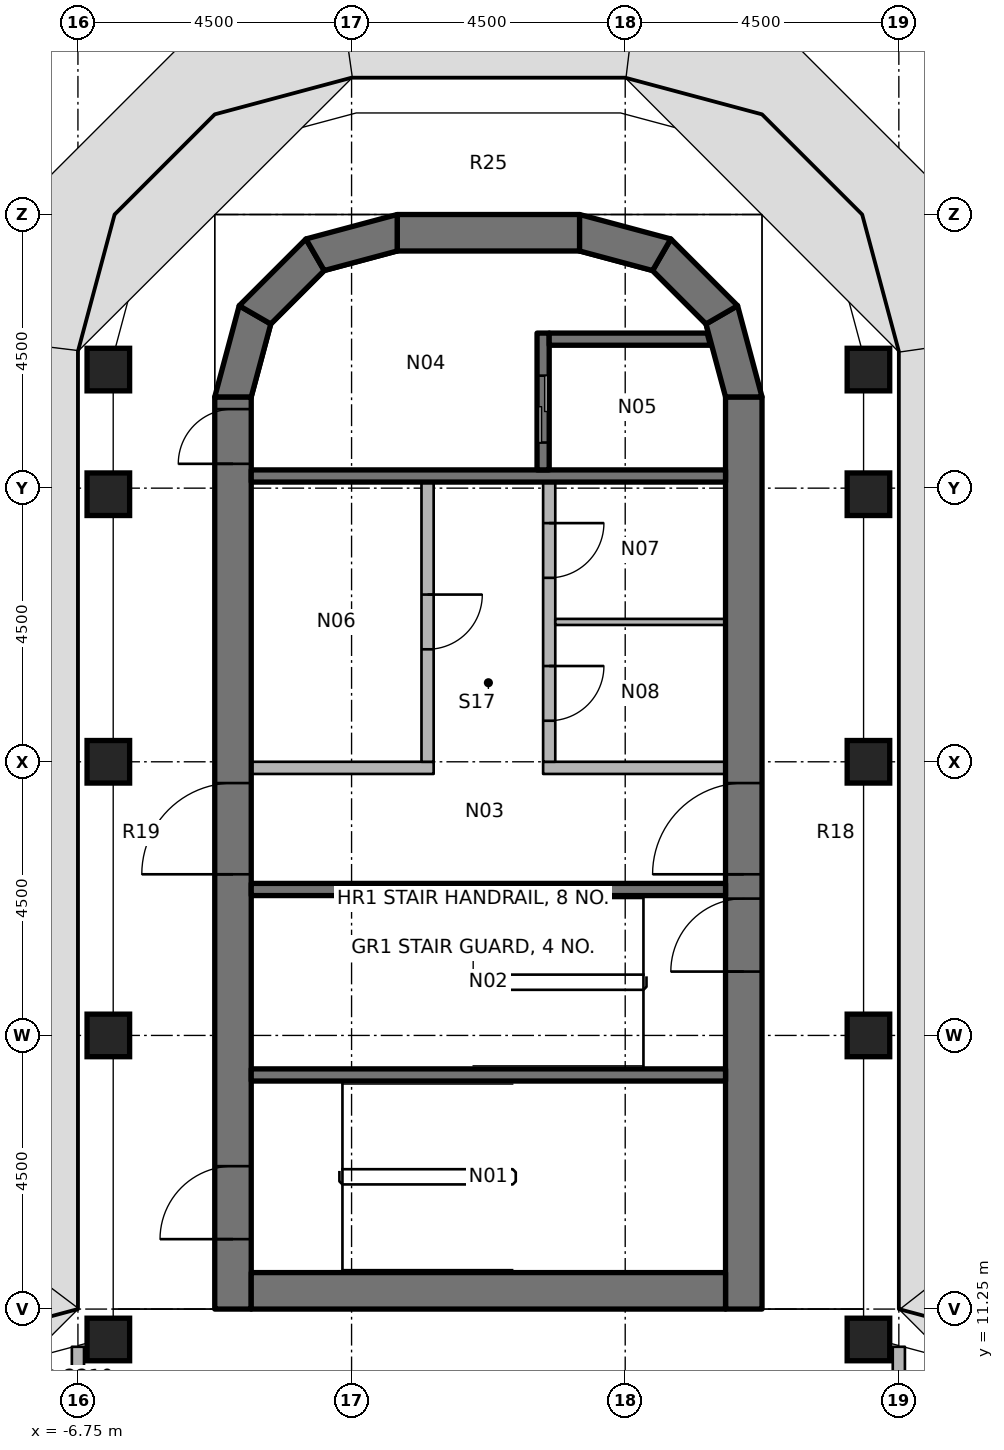
"""IFC4 building model, lengths in metres.
Left out: names, types, materials, properties, quantities, classifications, styles, units other than length and angle.
Written with IfcOpenShell. Run it as: python <this file> out.ifc"""

import sys

from ifc_helpers import new_model, si_unit, direction, frame, frame_2d, origin, origin_2d, place, context, subcontext, project, spatial, polyline, rectangle, outline, extrude, element, fill, save


model = new_model("IFC4")
c1 = context("Model", 3, precision=1e-05, world=origin(), true_north=direction((0.0, 1.0)))
c2 = subcontext(c1, "Body", "Model", "MODEL_VIEW")
j1 = project(units=[si_unit("LENGTHUNIT", "METRE"), si_unit("PLANEANGLEUNIT", "RADIAN")], contexts=[c1])
p1 = place(None, origin())
s1 = spatial("IfcSite", under=j1, at=p1, CompositionType="ELEMENT")
p2 = place(p1, origin())
s2 = spatial("IfcBuilding", under=s1, at=p2, CompositionType="ELEMENT")
p3 = place(p2, frame((0.0, 0.0, 206.8)))
s3 = spatial("IfcBuildingStorey", under=s2, at=p3, CompositionType="ELEMENT", Elevation=206.8)
for number, where, z_axis, x_axis in (
    (1, (-6.25, 10.75, 0.0), (0.0, 0.0, 1.0), (1.0, 0.0, 0.0)),
    (2, (-6.25, 15.75, 0.0), (0.0, 0.0, 1.0), (1.0, 0.0, 0.0)),
    (3, (-6.25, 20.25, 0.0), (0.0, 0.0, 1.0), (1.0, 0.0, 0.0)),
    (4, (-6.25, 24.65, 0.0), (0.0, 0.0, 1.0), (1.0, 0.0, 0.0)),
    (5, (-6.25, 26.7, 0.0), (0.0, 0.0, 1.0), (1.0, 0.0, 0.0)),
    (6, (6.25, 10.75, 0.0), (0.0, 0.0, 1.0), (1.0, 0.0, 0.0)),
    (7, (6.25, 15.75, 0.0), (0.0, 0.0, 1.0), (1.0, 0.0, 0.0)),
    (8, (6.25, 20.25, 0.0), (0.0, 0.0, 1.0), (1.0, 0.0, 0.0)),
    (9, (6.25, 24.65, 0.0), (0.0, 0.0, 1.0), (1.0, 0.0, 0.0)),
    (10, (6.25, 26.7, 0.0), (0.0, 0.0, 1.0), (1.0, 0.0, 0.0)),
):
    element("IfcColumn", number, at=place(p3, frame(where, z_axis=z_axis, x_axis=x_axis)), inside=s3, PredefinedType="COLUMN", context=c2, shape_type="SweptSolid", body=[
        extrude(rectangle(XDim=0.7, YDim=0.7, at=origin_2d()), origin(), (0.0, 0.0, 1.0), 3.65),
    ])
p4 = place(p3, frame((-4.2, 11.25, 0.0), z_axis=(0.0, 0.0, 1.0), x_axis=(0.0, 1.0, 0.0)))
e11 = element("IfcWall", 11, at=p4, inside=s3, PredefinedType="SHEAR", context=c2, shape_type="SweptSolid", body=[
    extrude(rectangle(XDim=15.0, YDim=0.6, at=frame_2d((7.5, 0.0))), origin(), (0.0, 0.0, 1.0), 3.8),
])
p5 = place(p4, frame((7.15, 0.0, 0.0)))
e12 = element("IfcOpeningElement", 12, at=p5, cuts=e11, PredefinedType="OPENING", context=c2, shape_type="SweptSolid", body=[
    extrude(rectangle(XDim=1.5, YDim=2.3, at=frame_2d((0.75, 1.15))), frame((0.0, 0.31, 0.0), z_axis=(0.0, -1.0, 0.0), x_axis=(1.0, 0.0, 0.0)), (0.0, 0.0, 1.0), 0.62),
])
p6 = place(p4, frame((13.9, 0.0, 0.0)))
e13 = element("IfcOpeningElement", 13, at=p6, cuts=e11, PredefinedType="OPENING", context=c2, shape_type="SweptSolid", body=[
    extrude(rectangle(XDim=0.9, YDim=2.1, at=frame_2d((0.45, 1.05))), frame((0.0, 0.31, 0.0), z_axis=(0.0, -1.0, 0.0), x_axis=(1.0, 0.0, 0.0)), (0.0, 0.0, 1.0), 0.62),
])
p7 = place(p4, frame((1.15, 0.0, 0.0)))
e14 = element("IfcOpeningElement", 14, at=p7, cuts=e11, PredefinedType="OPENING", context=c2, shape_type="SweptSolid", body=[
    extrude(rectangle(XDim=1.2, YDim=2.1, at=frame_2d((0.6, 1.05))), frame((0.0, 0.31, 0.0), z_axis=(0.0, -1.0, 0.0), x_axis=(1.0, 0.0, 0.0)), (0.0, 0.0, 1.0), 0.62),
])
p8 = place(p3, frame((4.2, 11.25, 0.0), z_axis=(0.0, 0.0, 1.0), x_axis=(0.0, 1.0, 0.0)))
e15 = element("IfcWall", 15, at=p8, inside=s3, PredefinedType="SHEAR", context=c2, shape_type="SweptSolid", body=[
    extrude(rectangle(XDim=15.0, YDim=0.6, at=frame_2d((7.5, 0.0))), origin(), (0.0, 0.0, 1.0), 3.8),
])
p9 = place(p8, frame((7.15, 0.0, 0.0)))
e16 = element("IfcOpeningElement", 16, at=p9, cuts=e15, PredefinedType="OPENING", context=c2, shape_type="SweptSolid", body=[
    extrude(rectangle(XDim=1.5, YDim=2.3, at=frame_2d((0.75, 1.15))), frame((0.0, 0.31, 0.0), z_axis=(0.0, -1.0, 0.0), x_axis=(1.0, 0.0, 0.0)), (0.0, 0.0, 1.0), 0.62),
])
p10 = place(p8, frame((5.55, 0.0, 0.0)))
e17 = element("IfcOpeningElement", 17, at=p10, cuts=e15, PredefinedType="OPENING", context=c2, shape_type="SweptSolid", body=[
    extrude(rectangle(XDim=1.2, YDim=2.1, at=frame_2d((0.6, 1.05))), frame((0.0, 0.31, 0.0), z_axis=(0.0, -1.0, 0.0), x_axis=(1.0, 0.0, 0.0)), (0.0, 0.0, 1.0), 0.62),
])
p11 = place(p3, frame((-3.9, 11.55, 0.0), z_axis=(0.0, 0.0, 1.0), x_axis=(1.0, 0.0, 0.0)))
e18 = element("IfcWall", 18, at=p11, inside=s3, PredefinedType="SHEAR", context=c2, shape_type="SweptSolid", body=[
    extrude(rectangle(XDim=7.8, YDim=0.6, at=frame_2d((3.9, 0.0))), origin(), (0.0, 0.0, 1.0), 3.8),
])
p12 = place(p3, frame((-1.5, 28.95, 0.0), z_axis=(0.0, 0.0, 1.0), x_axis=(1.0, 0.0, 0.0)))
e19 = element("IfcWall", 19, at=p12, inside=s3, PredefinedType="SHEAR", context=c2, shape_type="SweptSolid", body=[
    extrude(rectangle(XDim=3.0, YDim=0.6, at=frame_2d((1.5, 0.0))), origin(), (0.0, 0.0, 1.0), 3.8),
])
p13 = place(p3, origin())
e20 = element("IfcWall", 20, at=p13, inside=s3, PredefinedType="SHEAR", context=c2, shape_type="SweptSolid", body=[
    extrude(outline(polyline([(-4.5, 26.25), (-4.098, 27.75), (-3.579, 27.45), (-3.9, 26.25), (-4.5, 26.25)])), origin(), (0.0, 0.0, 1.0), 3.8),
])
p14 = place(p3, origin())
e21 = element("IfcWall", 21, at=p14, inside=s3, PredefinedType="SHEAR", context=c2, shape_type="SweptSolid", body=[
    extrude(outline(polyline([(-4.098, 27.75), (-3.0, 28.848), (-2.7, 28.329), (-3.579, 27.45), (-4.098, 27.75)])), origin(), (0.0, 0.0, 1.0), 3.8),
])
p15 = place(p3, origin())
e22 = element("IfcWall", 22, at=p15, inside=s3, PredefinedType="SHEAR", context=c2, shape_type="SweptSolid", body=[
    extrude(outline(polyline([(-3.0, 28.848), (-1.5, 29.25), (-1.5, 28.65), (-2.7, 28.329), (-3.0, 28.848)])), origin(), (0.0, 0.0, 1.0), 3.8),
])
p16 = place(p3, origin())
e23 = element("IfcWall", 23, at=p16, inside=s3, PredefinedType="SHEAR", context=c2, shape_type="SweptSolid", body=[
    extrude(outline(polyline([(4.5, 26.25), (4.098, 27.75), (3.579, 27.45), (3.9, 26.25), (4.5, 26.25)])), origin(), (0.0, 0.0, 1.0), 3.8),
])
p17 = place(p3, origin())
e24 = element("IfcWall", 24, at=p17, inside=s3, PredefinedType="SHEAR", context=c2, shape_type="SweptSolid", body=[
    extrude(outline(polyline([(4.098, 27.75), (3.0, 28.848), (2.7, 28.329), (3.579, 27.45), (4.098, 27.75)])), origin(), (0.0, 0.0, 1.0), 3.8),
])
p18 = place(p3, origin())
e25 = element("IfcWall", 25, at=p18, inside=s3, PredefinedType="SHEAR", context=c2, shape_type="SweptSolid", body=[
    extrude(outline(polyline([(3.0, 28.848), (1.5, 29.25), (1.5, 28.65), (2.7, 28.329), (3.0, 28.848)])), origin(), (0.0, 0.0, 1.0), 3.8),
])
p19 = place(p3, frame((-3.9, 24.95, 0.0), z_axis=(0.0, 0.0, 1.0), x_axis=(1.0, 0.0, 0.0)))
e26 = element("IfcWall", 26, at=p19, inside=s3, PredefinedType="SHEAR", context=c2, shape_type="SweptSolid", body=[
    extrude(rectangle(XDim=7.8, YDim=0.2, at=frame_2d((3.9, 0.0))), origin(), (0.0, 0.0, 1.0), 3.65),
])
p20 = place(p3, frame((0.9, 27.3, 0.0), z_axis=(0.0, 0.0, 1.0), x_axis=(0.0, -1.0, 0.0)))
e27 = element("IfcWall", 27, at=p20, inside=s3, PredefinedType="SHEAR", context=c2, shape_type="SweptSolid", body=[
    extrude(rectangle(XDim=2.25, YDim=0.2, at=frame_2d((1.125, 0.0))), origin(), (0.0, 0.0, 1.0), 3.65),
])
p21 = place(p20, frame((0.7, 0.0, 0.0)))
e28 = element("IfcOpeningElement", 28, at=p21, cuts=e27, PredefinedType="OPENING", context=c2, shape_type="SweptSolid", body=[
    extrude(rectangle(XDim=1.1, YDim=2.3, at=frame_2d((0.55, 1.15))), frame((0.0, 0.11, 0.0), z_axis=(0.0, -1.0, 0.0), x_axis=(1.0, 0.0, 0.0)), (0.0, 0.0, 1.0), 0.22),
])
p22 = place(p3, origin())
e29 = element("IfcWall", 29, at=p22, inside=s3, PredefinedType="SHEAR", context=c2, shape_type="SweptSolid", body=[
    extrude(outline(polyline([(1.0, 27.1), (3.651, 27.1), (3.597, 27.3), (1.0, 27.3), (1.0, 27.1)])), origin(), (0.0, 0.0, 1.0), 3.65),
])
for number, where, z_axis, x_axis in (
    (30, (-3.9, 18.15, 0.0), (0.0, 0.0, 1.0), (1.0, 0.0, 0.0)),
    (31, (-3.9, 15.1, 0.0), (0.0, 0.0, 1.0), (1.0, 0.0, 0.0)),
):
    element("IfcWall", number, at=place(p3, frame(where, z_axis=z_axis, x_axis=x_axis)), inside=s3, PredefinedType="SHEAR", context=c2, shape_type="SweptSolid", body=[
        extrude(rectangle(XDim=7.8, YDim=0.2, at=frame_2d((3.9, 0.0))), origin(), (0.0, 0.0, 1.0), 3.65),
    ])
p23 = place(p3, frame((-3.9, 20.15, 0.0), z_axis=(0.0, 0.0, 1.0), x_axis=(1.0, 0.0, 0.0)))
e32 = element("IfcWall", 32, at=p23, inside=s3, PredefinedType="PARTITIONING", context=c2, shape_type="SweptSolid", body=[
    extrude(rectangle(XDim=3.0, YDim=0.2, at=frame_2d((1.5, 0.0))), origin(), (0.0, 0.0, 1.0), 3.65),
])
p24 = place(p3, frame((-1.0, 24.85, 0.0), z_axis=(0.0, 0.0, 1.0), x_axis=(0.0, -1.0, 0.0)))
e33 = element("IfcWall", 33, at=p24, inside=s3, PredefinedType="PARTITIONING", context=c2, shape_type="SweptSolid", body=[
    extrude(rectangle(XDim=4.6, YDim=0.2, at=frame_2d((2.3, 0.0))), origin(), (0.0, 0.0, 1.0), 3.65),
])
p25 = place(p24, frame((1.85, 0.0, 0.0)))
e34 = element("IfcOpeningElement", 34, at=p25, cuts=e33, PredefinedType="OPENING", context=c2, shape_type="SweptSolid", body=[
    extrude(rectangle(XDim=0.9, YDim=2.1, at=frame_2d((0.45, 1.05))), frame((0.0, 0.11, 0.0), z_axis=(0.0, -1.0, 0.0), x_axis=(1.0, 0.0, 0.0)), (0.0, 0.0, 1.0), 0.22),
])
p26 = place(p3, frame((0.9, 20.15, 0.0), z_axis=(0.0, 0.0, 1.0), x_axis=(1.0, 0.0, 0.0)))
e35 = element("IfcWall", 35, at=p26, inside=s3, PredefinedType="PARTITIONING", context=c2, shape_type="SweptSolid", body=[
    extrude(rectangle(XDim=3.0, YDim=0.2, at=frame_2d((1.5, 0.0))), origin(), (0.0, 0.0, 1.0), 3.65),
])
p27 = place(p3, frame((1.0, 24.85, 0.0), z_axis=(0.0, 0.0, 1.0), x_axis=(0.0, -1.0, 0.0)))
e36 = element("IfcWall", 36, at=p27, inside=s3, PredefinedType="PARTITIONING", context=c2, shape_type="SweptSolid", body=[
    extrude(rectangle(XDim=4.6, YDim=0.2, at=frame_2d((2.3, 0.0))), origin(), (0.0, 0.0, 1.0), 3.65),
])
p28 = place(p27, frame((0.675, 0.0, 0.0)))
e37 = element("IfcOpeningElement", 37, at=p28, cuts=e36, PredefinedType="OPENING", context=c2, shape_type="SweptSolid", body=[
    extrude(rectangle(XDim=0.9, YDim=2.1, at=frame_2d((0.45, 1.05))), frame((0.0, 0.11, 0.0), z_axis=(0.0, -1.0, 0.0), x_axis=(1.0, 0.0, 0.0)), (0.0, 0.0, 1.0), 0.22),
])
p29 = place(p27, frame((3.025, 0.0, 0.0)))
e38 = element("IfcOpeningElement", 38, at=p29, cuts=e36, PredefinedType="OPENING", context=c2, shape_type="SweptSolid", body=[
    extrude(rectangle(XDim=0.9, YDim=2.1, at=frame_2d((0.45, 1.05))), frame((0.0, 0.11, 0.0), z_axis=(0.0, -1.0, 0.0), x_axis=(1.0, 0.0, 0.0)), (0.0, 0.0, 1.0), 0.22),
])
p30 = place(p3, frame((1.1, 22.55, 0.0), z_axis=(0.0, 0.0, 1.0), x_axis=(1.0, 0.0, 0.0)))
e39 = element("IfcWall", 39, at=p30, inside=s3, PredefinedType="PARTITIONING", context=c2, shape_type="SweptSolid", body=[
    extrude(rectangle(XDim=2.8, YDim=0.1, at=frame_2d((1.4, 0.0))), origin(), (0.0, 0.0, 1.0), 3.65),
])
p31 = place(p3, frame((6.75, 6.85, 0.0), z_axis=(0.0, 0.0, 1.0), x_axis=(0.0, 1.0, 0.0)))
e40 = element("IfcWall", 40, at=p31, inside=s3, PredefinedType="PARTITIONING", context=c2, shape_type="SweptSolid", body=[
    extrude(rectangle(XDim=3.78, YDim=0.2, at=frame_2d((1.89, 0.0))), origin(), (0.0, 0.0, 1.0), 2.75),
])
p32 = place(p3, frame((-6.75, 6.85, 0.0), z_axis=(0.0, 0.0, 1.0), x_axis=(0.0, 1.0, 0.0)))
e41 = element("IfcWall", 41, at=p32, inside=s3, PredefinedType="PARTITIONING", context=c2, shape_type="SweptSolid", body=[
    extrude(rectangle(XDim=3.78, YDim=0.2, at=frame_2d((1.89, 0.0))), origin(), (0.0, 0.0, 1.0), 2.75),
])
p33 = place(p32, frame((1.44, 0.0, 0.0)))
e42 = element("IfcOpeningElement", 42, at=p33, cuts=e41, PredefinedType="OPENING", context=c2, shape_type="SweptSolid", body=[
    extrude(rectangle(XDim=0.9, YDim=2.1, at=frame_2d((0.45, 1.05))), frame((0.0, 0.11, 0.0), z_axis=(0.0, -1.0, 0.0), x_axis=(1.0, 0.0, 0.0)), (0.0, 0.0, 1.0), 0.22),
])
p34 = place(p5, origin())
e43 = element("IfcDoor", 43, at=p34, inside=s3, OperationType="DOUBLE_DOOR_SINGLE_SWING", PredefinedType="DOOR", context=c2, shape_type="SweptSolid", body=[
    extrude(rectangle(XDim=1.5, YDim=2.3, at=frame_2d((0.75, 1.15))), frame((0.0, 0.025, 0.0), z_axis=(0.0, -1.0, 0.0), x_axis=(1.0, 0.0, 0.0)), (0.0, 0.0, 1.0), 0.05),
])
fill(e12, e43)
p35 = place(p9, origin())
e44 = element("IfcDoor", 44, at=p35, inside=s3, OperationType="DOUBLE_DOOR_SINGLE_SWING", PredefinedType="DOOR", context=c2, shape_type="SweptSolid", body=[
    extrude(rectangle(XDim=1.5, YDim=2.3, at=frame_2d((0.75, 1.15))), frame((0.0, 0.025, 0.0), z_axis=(0.0, -1.0, 0.0), x_axis=(1.0, 0.0, 0.0)), (0.0, 0.0, 1.0), 0.05),
])
fill(e16, e44)
p36 = place(p6, origin())
e45 = element("IfcDoor", 45, at=p36, inside=s3, OperationType="SINGLE_SWING_RIGHT", PredefinedType="DOOR", context=c2, shape_type="SweptSolid", body=[
    extrude(rectangle(XDim=0.9, YDim=2.1, at=frame_2d((0.45, 1.05))), frame((0.0, 0.025, 0.0), z_axis=(0.0, -1.0, 0.0), x_axis=(1.0, 0.0, 0.0)), (0.0, 0.0, 1.0), 0.05),
])
fill(e13, e45)
p37 = place(p10, origin())
e46 = element("IfcDoor", 46, at=p37, inside=s3, OperationType="SINGLE_SWING_RIGHT", PredefinedType="DOOR", context=c2, shape_type="SweptSolid", body=[
    extrude(rectangle(XDim=1.2, YDim=2.1, at=frame_2d((0.6, 1.05))), frame((0.0, 0.025, 0.0), z_axis=(0.0, -1.0, 0.0), x_axis=(1.0, 0.0, 0.0)), (0.0, 0.0, 1.0), 0.05),
])
fill(e17, e46)
p38 = place(p7, origin())
e47 = element("IfcDoor", 47, at=p38, inside=s3, OperationType="SINGLE_SWING_LEFT", PredefinedType="DOOR", context=c2, shape_type="SweptSolid", body=[
    extrude(rectangle(XDim=1.2, YDim=2.1, at=frame_2d((0.6, 1.05))), frame((0.0, 0.025, 0.0), z_axis=(0.0, -1.0, 0.0), x_axis=(1.0, 0.0, 0.0)), (0.0, 0.0, 1.0), 0.05),
])
fill(e14, e47)
p39 = place(p21, origin())
e48 = element("IfcDoor", 48, at=p39, inside=s3, OperationType="DOUBLE_DOOR_SLIDING", PredefinedType="DOOR", context=c2, shape_type="SweptSolid", body=[
    extrude(rectangle(XDim=1.1, YDim=2.3, at=frame_2d((0.55, 1.15))), frame((0.0, 0.025, 0.0), z_axis=(0.0, -1.0, 0.0), x_axis=(1.0, 0.0, 0.0)), (0.0, 0.0, 1.0), 0.05),
])
fill(e28, e48)
p40 = place(p25, origin())
e49 = element("IfcDoor", 49, at=p40, inside=s3, OperationType="SINGLE_SWING_LEFT", PredefinedType="DOOR", context=c2, shape_type="SweptSolid", body=[
    extrude(rectangle(XDim=0.9, YDim=2.1, at=frame_2d((0.45, 1.05))), frame((0.0, 0.025, 0.0), z_axis=(0.0, -1.0, 0.0), x_axis=(1.0, 0.0, 0.0)), (0.0, 0.0, 1.0), 0.05),
])
fill(e34, e49)
p41 = place(p28, origin())
e50 = element("IfcDoor", 50, at=p41, inside=s3, OperationType="SINGLE_SWING_RIGHT", PredefinedType="DOOR", context=c2, shape_type="SweptSolid", body=[
    extrude(rectangle(XDim=0.9, YDim=2.1, at=frame_2d((0.45, 1.05))), frame((0.0, 0.025, 0.0), z_axis=(0.0, -1.0, 0.0), x_axis=(1.0, 0.0, 0.0)), (0.0, 0.0, 1.0), 0.05),
])
fill(e37, e50)
p42 = place(p29, origin())
e51 = element("IfcDoor", 51, at=p42, inside=s3, OperationType="SINGLE_SWING_LEFT", PredefinedType="DOOR", context=c2, shape_type="SweptSolid", body=[
    extrude(rectangle(XDim=0.9, YDim=2.1, at=frame_2d((0.45, 1.05))), frame((0.0, 0.025, 0.0), z_axis=(0.0, -1.0, 0.0), x_axis=(1.0, 0.0, 0.0)), (0.0, 0.0, 1.0), 0.05),
])
fill(e38, e51)
save(model, sys.argv[1])
